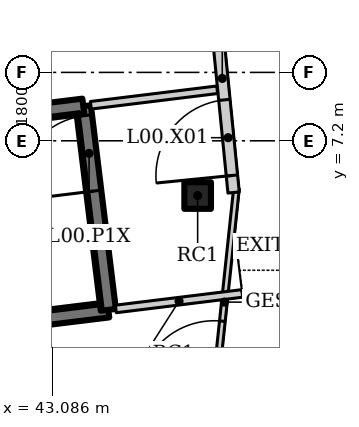
"""IFC4 building model, lengths in metres.
Left out: names, types, materials, properties, quantities, classifications, styles, units other than length and angle.
Written with IfcOpenShell. Run it as: python <this file> out.ifc"""

import sys

from ifc_helpers import new_model, si_unit, direction, frame, frame_2d, origin, origin_2d, place, context, subcontext, project, spatial, rectangle, hollow_rectangle, extrude, element, fill, save


model = new_model("IFC4")
c1 = context("Model", 3, precision=1e-05, world=origin(), true_north=direction((0.0, 1.0)))
c2 = subcontext(c1, "Body", "Model", "MODEL_VIEW")
j1 = project(units=[si_unit("LENGTHUNIT", "METRE"), si_unit("PLANEANGLEUNIT", "RADIAN")], contexts=[c1])
p1 = place(None, origin())
s1 = spatial("IfcSite", under=j1, at=p1, CompositionType="ELEMENT")
p2 = place(p1, origin())
s2 = spatial("IfcBuilding", under=s1, at=p2, CompositionType="ELEMENT")
p3 = place(p2, origin())
s3 = spatial("IfcBuildingStorey", under=s2, at=p3, CompositionType="ELEMENT", Elevation=0.0)
p4 = place(p3, frame((46.908, 5.76, 0.0), z_axis=(0.0, 0.0, 1.0), x_axis=(1.0, 0.0, 0.0)))
e1 = element("IfcColumn", 1, at=p4, inside=s3, PredefinedType="COLUMN", context=c2, shape_type="SweptSolid", body=[
    extrude(hollow_rectangle(XDim=0.7, YDim=0.7, WallThickness=0.04, at=origin_2d()), origin(), (0.0, 0.0, 1.0), 6.5),
])
p5 = place(p3, frame((47.294, -0.032, 0.0), z_axis=(0.0, 0.0, 1.0), x_axis=(0.105835648981, 0.99438363593, 0.0)))
e2 = element("IfcWall", 2, at=p5, inside=s3, PredefinedType="ELEMENTEDWALL", context=c2, shape_type="SweptSolid", body=[
    extrude(rectangle(XDim=6.007, YDim=0.15, at=frame_2d((3.003, 0.0))), origin(), (0.0, 0.0, 1.0), 6.3),
])
p6 = place(p5, frame((0.5, 0.0, 0.0)))
e3 = element("IfcOpeningElement", 3, at=p6, cuts=e2, PredefinedType="OPENING", context=c2, shape_type="SweptSolid", body=[
    extrude(rectangle(XDim=2.0, YDim=2.4, at=frame_2d((1.0, 1.2))), frame((0.0, 0.085, 0.0), z_axis=(0.0, -1.0, 0.0), x_axis=(1.0, 0.0, 0.0)), (0.0, 0.0, 1.0), 0.17),
])
p7 = place(p3, frame((47.854, 5.839, 0.0), z_axis=(0.0, 0.0, 1.0), x_axis=(-0.099051198898, 0.9950823383, 0.0)))
e4 = element("IfcWall", 4, at=p7, inside=s3, PredefinedType="SOLIDWALL", context=c2, shape_type="SweptSolid", body=[
    extrude(rectangle(XDim=6.036, YDim=0.3, at=frame_2d((3.018, 0.0))), origin(), (0.0, 0.0, 1.0), 6.3),
])
p8 = place(p7, frame((0.45, 0.0, 0.0)))
e5 = element("IfcOpeningElement", 5, at=p8, cuts=e4, PredefinedType="OPENING", context=c2, shape_type="SweptSolid", body=[
    extrude(rectangle(XDim=2.0, YDim=2.1, at=frame_2d((1.0, 1.05))), frame((0.0, 0.16, 0.0), z_axis=(0.0, -1.0, 0.0), x_axis=(1.0, 0.0, 0.0)), (0.0, 0.0, 1.0), 0.32),
])
p9 = place(p3, frame((44.756, 2.775, 0.0), z_axis=(0.0, 0.0, 1.0), x_axis=(0.992549022568, 0.121845959305, 0.0)))
e6 = element("IfcWall", 6, at=p9, inside=s3, PredefinedType="SOLIDWALL", context=c2, shape_type="SweptSolid", body=[
    extrude(rectangle(XDim=3.35, YDim=0.2, at=frame_2d((1.675, 0.0))), origin(), (0.0, 0.0, 1.0), 6.3),
])
p10 = place(p3, frame((44.098, 8.135, 0.0), z_axis=(0.0, 0.0, 1.0), x_axis=(0.992547940526, 0.121854773226, 0.0)))
e7 = element("IfcWall", 7, at=p10, inside=s3, PredefinedType="SOLIDWALL", context=c2, shape_type="SweptSolid", body=[
    extrude(rectangle(XDim=3.35, YDim=0.2, at=frame_2d((1.675, 0.0))), origin(), (0.0, 0.0, 1.0), 6.3),
])
p11 = place(p3, frame((35.823, 1.678, 0.0), z_axis=(0.0, 0.0, 1.0), x_axis=(0.992545280606, 0.121876437212, 0.0)))
e8 = element("IfcWall", 8, at=p11, inside=s3, PredefinedType="SHEAR", context=c2, shape_type="SweptSolid", body=[
    extrude(rectangle(XDim=8.8, YDim=0.4, at=frame_2d((4.4, 0.0))), origin(), (0.0, 0.0, 1.0), 6.5),
])
p12 = place(p3, frame((44.557, 2.751, 0.0), z_axis=(0.0, 0.0, 1.0), x_axis=(-0.12184754212, 0.99254882826, 0.0)))
e9 = element("IfcWall", 9, at=p12, inside=s3, PredefinedType="SHEAR", context=c2, shape_type="SweptSolid", body=[
    extrude(rectangle(XDim=5.4, YDim=0.4, at=frame_2d((2.7, 0.0))), origin(), (0.0, 0.0, 1.0), 6.5),
])
p13 = place(p12, frame((3.15, 0.0, 0.0)))
e10 = element("IfcOpeningElement", 10, at=p13, cuts=e9, PredefinedType="OPENING", context=c2, shape_type="SweptSolid", body=[
    extrude(rectangle(XDim=2.0, YDim=2.1, at=frame_2d((1.0, 1.05))), frame((0.0, 0.21, 0.0), z_axis=(0.0, -1.0, 0.0), x_axis=(1.0, 0.0, 0.0)), (0.0, 0.0, 1.0), 0.42),
])
p14 = place(p3, frame((43.899, 8.11, 0.0), z_axis=(0.0, 0.0, 1.0), x_axis=(-0.992545280606, -0.121876437212, 0.0)))
e11 = element("IfcWall", 11, at=p14, inside=s3, PredefinedType="SHEAR", context=c2, shape_type="SweptSolid", body=[
    extrude(rectangle(XDim=8.8, YDim=0.4, at=frame_2d((4.4, 0.0))), origin(), (0.0, 0.0, 1.0), 6.5),
])
p15 = place(p6, origin())
e12 = element("IfcDoor", 12, at=p15, inside=s3, OperationType="DOUBLE_DOOR_DOUBLE_SWING", PredefinedType="DOOR", context=c2, shape_type="SweptSolid", body=[
    extrude(rectangle(XDim=2.0, YDim=2.4, at=frame_2d((1.0, 1.2))), frame((0.0, 0.025, 0.0), z_axis=(0.0, -1.0, 0.0), x_axis=(1.0, 0.0, 0.0)), (0.0, 0.0, 1.0), 0.05),
])
fill(e3, e12)
p16 = place(p8, origin())
e13 = element("IfcDoor", 13, at=p16, inside=s3, OperationType="DOUBLE_DOOR_DOUBLE_SWING", PredefinedType="DOOR", context=c2, shape_type="SweptSolid", body=[
    extrude(rectangle(XDim=2.0, YDim=2.1, at=frame_2d((1.0, 1.05))), frame((0.0, 0.025, 0.0), z_axis=(0.0, -1.0, 0.0), x_axis=(1.0, 0.0, 0.0)), (0.0, 0.0, 1.0), 0.05),
])
fill(e5, e13)
p17 = place(p13, origin())
e14 = element("IfcDoor", 14, at=p17, inside=s3, OperationType="DOUBLE_DOOR_DOUBLE_SWING", PredefinedType="DOOR", context=c2, shape_type="SweptSolid", body=[
    extrude(rectangle(XDim=2.0, YDim=2.1, at=frame_2d((1.0, 1.05))), frame((0.0, 0.025, 0.0), z_axis=(0.0, -1.0, 0.0), x_axis=(1.0, 0.0, 0.0)), (0.0, 0.0, 1.0), 0.05),
])
fill(e10, e14)
save(model, sys.argv[1])
